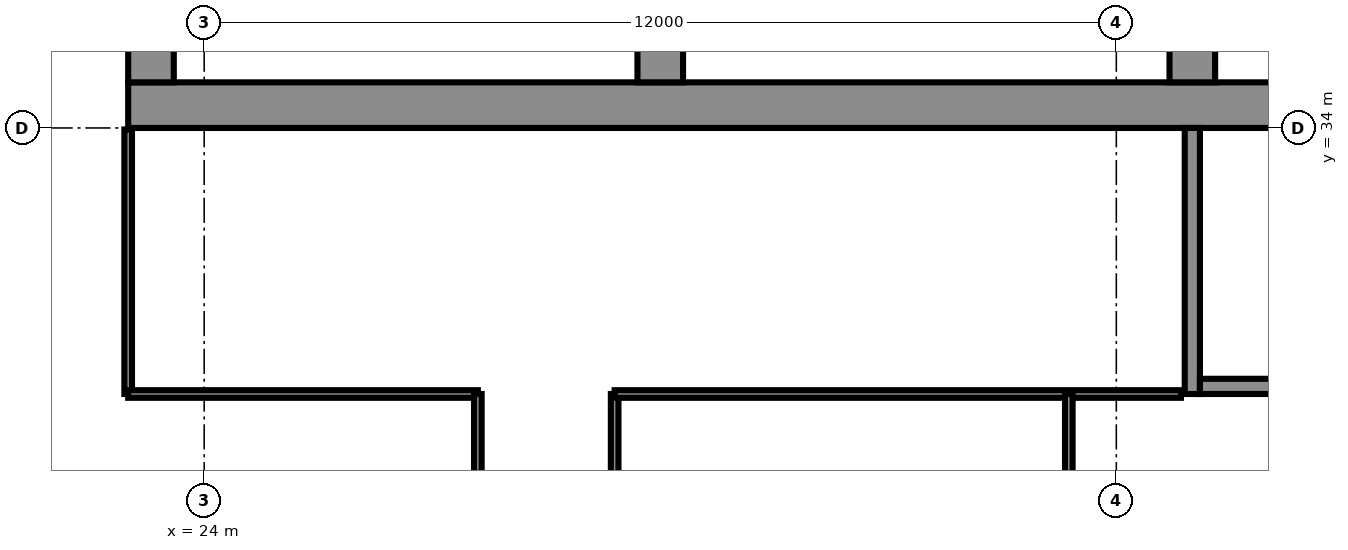
"""IFC4 building model, lengths in metres.
Left out: names, types, materials, properties, quantities, classifications, styles, units other than length and angle.
Written with IfcOpenShell. Run it as: python <this file> out.ifc"""

import sys

from ifc_helpers import new_model, si_unit, direction, frame, frame_2d, origin, place, context, subcontext, project, spatial, polyline, rectangle, outline, extrude, element, fill, save


model = new_model("IFC4")
c1 = context("Model", 3, precision=1e-05, world=origin(), true_north=direction((0.0, 1.0)))
c2 = subcontext(c1, "Body", "Model", "MODEL_VIEW")
j1 = project(units=[si_unit("LENGTHUNIT", "METRE"), si_unit("PLANEANGLEUNIT", "RADIAN")], contexts=[c1])
p1 = place(None, origin())
s1 = spatial("IfcSite", under=j1, at=p1, CompositionType="ELEMENT")
p2 = place(p1, origin())
s2 = spatial("IfcBuilding", under=s1, at=p2, CompositionType="ELEMENT")
p3 = place(p2, frame((0.0, 0.0, 207.1)))
s3 = spatial("IfcBuildingStorey", under=s2, at=p3, CompositionType="ELEMENT", Elevation=207.1)
p4 = place(p3, frame((23.0, 34.3, 0.0), z_axis=(0.0, 0.0, 1.0), x_axis=(1.0, 0.0, 0.0)))
e1 = element("IfcWall", 1, at=p4, inside=s3, PredefinedType="SHEAR", context=c2, shape_type="SweptSolid", body=[
    extrude(rectangle(XDim=35.0, YDim=0.6, at=frame_2d((17.5, 0.0))), origin(), (0.0, 0.0, 1.0), 3.6),
])
p5 = place(p4, frame((0.65, 0.0, 0.0)))
e2 = element("IfcOpeningElement", 2, at=p5, cuts=e1, PredefinedType="OPENING", context=c2, shape_type="SweptSolid", body=[
    extrude(rectangle(XDim=1.2, YDim=2.1, at=frame_2d((0.6, 1.05))), frame((0.0, 0.31, 0.0), z_axis=(0.0, -1.0, 0.0), x_axis=(1.0, 0.0, 0.0)), (0.0, 0.0, 1.0), 0.62),
])
p6 = place(p4, frame((7.717, 0.0, 0.0)))
e3 = element("IfcOpeningElement", 3, at=p6, cuts=e1, PredefinedType="OPENING", context=c2, shape_type="SweptSolid", body=[
    extrude(rectangle(XDim=1.1, YDim=2.1, at=frame_2d((0.55, 1.05))), frame((0.0, 0.31, 0.0), z_axis=(0.0, -1.0, 0.0), x_axis=(1.0, 0.0, 0.0)), (0.0, 0.0, 1.0), 0.62),
])
p7 = place(p4, frame((12.183, 0.0, 0.0)))
e4 = element("IfcOpeningElement", 4, at=p7, cuts=e1, PredefinedType="OPENING", context=c2, shape_type="SweptSolid", body=[
    extrude(rectangle(XDim=1.1, YDim=2.1, at=frame_2d((0.55, 1.05))), frame((0.0, 0.31, 0.0), z_axis=(0.0, -1.0, 0.0), x_axis=(1.0, 0.0, 0.0)), (0.0, 0.0, 1.0), 0.62),
])
p8 = place(p4, frame((9.8, 0.0, 0.0)))
e5 = element("IfcOpeningElement", 5, at=p8, cuts=e1, PredefinedType="OPENING", context=c2, shape_type="SweptSolid", body=[
    extrude(rectangle(XDim=1.4, YDim=2.1, at=frame_2d((0.7, 1.05))), frame((0.0, 0.31, 0.0), z_axis=(0.0, -1.0, 0.0), x_axis=(1.0, 0.0, 0.0)), (0.0, 0.0, 1.0), 0.62),
])
p9 = place(p4, frame((14.717, 0.0, 0.0)))
e6 = element("IfcOpeningElement", 6, at=p9, cuts=e1, PredefinedType="OPENING", context=c2, shape_type="SweptSolid", body=[
    extrude(rectangle(XDim=1.1, YDim=2.1, at=frame_2d((0.55, 1.05))), frame((0.0, 0.31, 0.0), z_axis=(0.0, -1.0, 0.0), x_axis=(1.0, 0.0, 0.0)), (0.0, 0.0, 1.0), 0.62),
])
p10 = place(p4, frame((16.95, 0.0, 0.0)))
e7 = element("IfcOpeningElement", 7, at=p10, cuts=e1, PredefinedType="OPENING", context=c2, shape_type="SweptSolid", body=[
    extrude(rectangle(XDim=1.1, YDim=2.1, at=frame_2d((0.55, 1.05))), frame((0.0, 0.31, 0.0), z_axis=(0.0, -1.0, 0.0), x_axis=(1.0, 0.0, 0.0)), (0.0, 0.0, 1.0), 0.62),
])
p11 = place(p4, frame((19.183, 0.0, 0.0)))
e8 = element("IfcOpeningElement", 8, at=p11, cuts=e1, PredefinedType="OPENING", context=c2, shape_type="SweptSolid", body=[
    extrude(rectangle(XDim=1.1, YDim=2.1, at=frame_2d((0.55, 1.05))), frame((0.0, 0.31, 0.0), z_axis=(0.0, -1.0, 0.0), x_axis=(1.0, 0.0, 0.0)), (0.0, 0.0, 1.0), 0.62),
])
p12 = place(p4, frame((26.15, 0.0, 0.0)))
e9 = element("IfcOpeningElement", 9, at=p12, cuts=e1, PredefinedType="OPENING", context=c2, shape_type="SweptSolid", body=[
    extrude(rectangle(XDim=1.2, YDim=2.1, at=frame_2d((0.6, 1.05))), frame((0.0, 0.31, 0.0), z_axis=(0.0, -1.0, 0.0), x_axis=(1.0, 0.0, 0.0)), (0.0, 0.0, 1.0), 0.62),
])
p13 = place(p4, frame((28.767, 0.0, 0.0)))
e10 = element("IfcOpeningElement", 10, at=p13, cuts=e1, PredefinedType="OPENING", context=c2, shape_type="SweptSolid", body=[
    extrude(rectangle(XDim=1.0, YDim=2.1, at=frame_2d((0.5, 1.05))), frame((0.0, 0.31, 0.0), z_axis=(0.0, -1.0, 0.0), x_axis=(1.0, 0.0, 0.0)), (0.0, 0.0, 1.0), 0.62),
])
p14 = place(p4, frame((33.083, 0.0, 0.0)))
e11 = element("IfcOpeningElement", 11, at=p14, cuts=e1, PredefinedType="OPENING", context=c2, shape_type="SweptSolid", body=[
    extrude(rectangle(XDim=1.0, YDim=2.1, at=frame_2d((0.5, 1.05))), frame((0.0, 0.31, 0.0), z_axis=(0.0, -1.0, 0.0), x_axis=(1.0, 0.0, 0.0)), (0.0, 0.0, 1.0), 0.62),
])
p15 = place(p4, frame((30.8, 0.0, 0.0)))
e12 = element("IfcOpeningElement", 12, at=p15, cuts=e1, PredefinedType="OPENING", context=c2, shape_type="SweptSolid", body=[
    extrude(rectangle(XDim=1.4, YDim=2.1, at=frame_2d((0.7, 1.05))), frame((0.0, 0.31, 0.0), z_axis=(0.0, -1.0, 0.0), x_axis=(1.0, 0.0, 0.0)), (0.0, 0.0, 1.0), 0.62),
])
p16 = place(p3, frame((23.3, 34.6, 0.0), z_axis=(0.0, 0.0, 1.0), x_axis=(0.0, 1.0, 0.0)))
e13 = element("IfcWall", 13, at=p16, inside=s3, PredefinedType="SHEAR", context=c2, shape_type="SweptSolid", body=[
    extrude(rectangle(XDim=13.585, YDim=0.6, at=frame_2d((6.792, 0.0))), origin(), (0.0, 0.0, 1.0), 3.6),
])
p17 = place(p3, frame((30.0, 34.6, 0.0), z_axis=(0.0, 0.0, 1.0), x_axis=(0.0, 1.0, 0.0)))
e14 = element("IfcWall", 14, at=p17, inside=s3, PredefinedType="SHEAR", context=c2, shape_type="SweptSolid", body=[
    extrude(rectangle(XDim=14.171, YDim=0.6, at=frame_2d((7.085, 0.0))), origin(), (0.0, 0.0, 1.0), 3.6),
])
p18 = place(p17, frame((3.8, 0.0, 0.0)))
e15 = element("IfcOpeningElement", 15, at=p18, cuts=e14, PredefinedType="OPENING", context=c2, shape_type="SweptSolid", body=[
    extrude(rectangle(XDim=1.1, YDim=2.1, at=frame_2d((0.55, 1.05))), frame((0.0, 0.31, 0.0), z_axis=(0.0, -1.0, 0.0), x_axis=(1.0, 0.0, 0.0)), (0.0, 0.0, 1.0), 0.62),
])
p19 = place(p3, frame((37.0, 34.6, 0.0), z_axis=(0.0, 0.0, 1.0), x_axis=(0.0, 1.0, 0.0)))
e16 = element("IfcWall", 16, at=p19, inside=s3, PredefinedType="SHEAR", context=c2, shape_type="SweptSolid", body=[
    extrude(rectangle(XDim=14.784, YDim=0.6, at=frame_2d((7.392, 0.0))), origin(), (0.0, 0.0, 1.0), 3.6),
])
p20 = place(p19, frame((11.302, 0.0, 0.0)))
e17 = element("IfcOpeningElement", 17, at=p20, cuts=e16, PredefinedType="OPENING", context=c2, shape_type="SweptSolid", body=[
    extrude(rectangle(XDim=1.0, YDim=2.1, at=frame_2d((0.5, 1.05))), frame((0.0, 0.31, 0.0), z_axis=(0.0, -1.0, 0.0), x_axis=(1.0, 0.0, 0.0)), (0.0, 0.0, 1.0), 0.62),
])
p21 = place(p19, frame((3.8, 0.0, 0.0)))
e18 = element("IfcOpeningElement", 18, at=p21, cuts=e16, PredefinedType="OPENING", context=c2, shape_type="SweptSolid", body=[
    extrude(rectangle(XDim=1.1, YDim=2.1, at=frame_2d((0.55, 1.05))), frame((0.0, 0.31, 0.0), z_axis=(0.0, -1.0, 0.0), x_axis=(1.0, 0.0, 0.0)), (0.0, 0.0, 1.0), 0.62),
])
p22 = place(p3, frame((0.0, 0.0, -0.0)))
e19 = element("IfcWall", 19, at=p22, inside=s3, PredefinedType="PARTITIONING", context=c2, shape_type="SweptSolid", body=[
    extrude(outline(polyline([(32.233, 37.45), (30.3, 37.45), (30.3, 37.65), (32.233, 37.65), (32.433, 37.65), (32.433, 34.6), (32.233, 34.6), (32.233, 37.45)])), origin(), (0.0, 0.0, 1.0), 3.2),
])
p23 = place(p3, frame((0.0, 0.0, -0.0)))
e20 = element("IfcWall", 20, at=p23, inside=s3, PredefinedType="PARTITIONING", context=c2, shape_type="SweptSolid", body=[
    extrude(outline(polyline([(34.567, 37.65), (34.767, 37.65), (36.7, 37.65), (36.7, 37.45), (34.767, 37.45), (34.767, 34.6), (34.567, 34.6), (34.567, 37.65)])), origin(), (0.0, 0.0, 1.0), 3.2),
])
p24 = place(p3, frame((0.0, 0.0, -0.0)))
e21 = element("IfcWall", 21, at=p24, inside=s3, PredefinedType="PARTITIONING", context=c2, shape_type="SweptSolid", body=[
    extrude(outline(polyline([(41.567, 37.1), (39.433, 37.1), (39.433, 34.6), (39.233, 34.6), (39.233, 37.45), (37.3, 37.45), (37.3, 37.65), (39.233, 37.65), (39.433, 37.65), (39.433, 37.3), (41.567, 37.3), (41.567, 37.35), (41.767, 37.35), (43.7, 37.35), (43.7, 37.15), (41.767, 37.15), (41.767, 34.6), (41.567, 34.6), (41.567, 37.1)])), origin(), (0.0, 0.0, 1.0), 3.2),
])
p25 = place(p3, frame((37.0, 30.5, 0.0), z_axis=(0.0, 0.0, 1.0), x_axis=(0.0, 1.0, 0.0)))
e22 = element("IfcWall", 22, at=p25, inside=s3, PredefinedType="PARTITIONING", context=c2, shape_type="SweptSolid", body=[
    extrude(rectangle(XDim=3.5, YDim=0.2, at=frame_2d((1.75, 0.0))), origin(), (0.0, 0.0, 1.0), 3.2),
])
p26 = place(p25, frame((1.2, 0.0, 0.0)))
e23 = element("IfcOpeningElement", 23, at=p26, cuts=e22, PredefinedType="OPENING", context=c2, shape_type="SweptSolid", body=[
    extrude(rectangle(XDim=1.1, YDim=2.1, at=frame_2d((0.55, 1.05))), frame((0.0, 0.11, 0.0), z_axis=(0.0, -1.0, 0.0), x_axis=(1.0, 0.0, 0.0)), (0.0, 0.0, 1.0), 0.22),
])
p27 = place(p3, frame((37.1, 30.6, 0.0), z_axis=(0.0, 0.0, 1.0), x_axis=(1.0, 0.0, 0.0)))
e24 = element("IfcWall", 24, at=p27, inside=s3, PredefinedType="PARTITIONING", context=c2, shape_type="SweptSolid", body=[
    extrude(rectangle(XDim=2.8, YDim=0.2, at=frame_2d((1.4, 0.0))), origin(), (0.0, 0.0, 1.0), 3.2),
])
p28 = place(p3, frame((23.0, 30.5, 0.0), z_axis=(0.0, 0.0, 1.0), x_axis=(0.0, 1.0, 0.0)))
e25 = element("IfcWall", 25, at=p28, inside=s3, PredefinedType="PARTITIONING", context=c2, shape_type="SweptSolid", body=[
    extrude(rectangle(XDim=3.48, YDim=0.1, at=frame_2d((1.74, 0.0))), origin(), (0.0, 0.0, 1.0), 3.2),
])
p29 = place(p28, frame((1.28, 0.0, 0.0)))
e26 = element("IfcOpeningElement", 26, at=p29, cuts=e25, PredefinedType="OPENING", context=c2, shape_type="SweptSolid", body=[
    extrude(rectangle(XDim=1.0, YDim=2.1, at=frame_2d((0.5, 1.05))), frame((0.0, 0.06, 0.0), z_axis=(0.0, -1.0, 0.0), x_axis=(1.0, 0.0, 0.0)), (0.0, 0.0, 1.0), 0.12),
])
p30 = place(p3, frame((23.0, 30.5, 0.0), z_axis=(0.0, 0.0, 1.0), x_axis=(1.0, 0.0, 0.0)))
e27 = element("IfcWall", 27, at=p30, inside=s3, PredefinedType="PARTITIONING", context=c2, shape_type="SweptSolid", body=[
    extrude(rectangle(XDim=4.6, YDim=0.1, at=frame_2d((2.3, 0.0))), origin(), (0.0, 0.0, 1.0), 3.2),
])
p31 = place(p3, frame((27.6, 23.9, 0.0), z_axis=(0.0, 0.0, 1.0), x_axis=(0.0, 1.0, 0.0)))
e28 = element("IfcWall", 28, at=p31, inside=s3, PredefinedType="PARTITIONING", context=c2, shape_type="SweptSolid", body=[
    extrude(rectangle(XDim=6.6, YDim=0.1, at=frame_2d((3.3, 0.0))), origin(), (0.0, 0.0, 1.0), 3.2),
])
p32 = place(p3, frame((29.4, 22.1, 0.0), z_axis=(0.0, 0.0, 1.0), x_axis=(0.0, 1.0, 0.0)))
e29 = element("IfcWall", 29, at=p32, inside=s3, PredefinedType="PARTITIONING", context=c2, shape_type="SweptSolid", body=[
    extrude(rectangle(XDim=8.4, YDim=0.1, at=frame_2d((4.2, 0.0))), origin(), (0.0, 0.0, 1.0), 3.2),
])
p33 = place(p3, frame((29.4, 30.5, 0.0), z_axis=(0.0, 0.0, 1.0), x_axis=(1.0, 0.0, 0.0)))
e30 = element("IfcWall", 30, at=p33, inside=s3, PredefinedType="PARTITIONING", context=c2, shape_type="SweptSolid", body=[
    extrude(rectangle(XDim=7.45, YDim=0.1, at=frame_2d((3.725, 0.0))), origin(), (0.0, 0.0, 1.0), 3.2),
])
p34 = place(p3, frame((35.375, 19.205, 0.0), z_axis=(0.0, 0.0, 1.0), x_axis=(0.0, 1.0, 0.0)))
e31 = element("IfcWall", 31, at=p34, inside=s3, PredefinedType="PARTITIONING", context=c2, shape_type="SweptSolid", body=[
    extrude(rectangle(XDim=11.295, YDim=0.1, at=frame_2d((5.647, 0.0))), origin(), (0.0, 0.0, 1.0), 3.2),
])
p35 = place(p5, origin())
e32 = element("IfcDoor", 32, at=p35, inside=s3, OperationType="SINGLE_SWING_LEFT", PredefinedType="DOOR", context=c2, shape_type="SweptSolid", body=[
    extrude(rectangle(XDim=1.2, YDim=2.1, at=frame_2d((0.6, 1.05))), frame((0.0, 0.025, 0.0), z_axis=(0.0, -1.0, 0.0), x_axis=(1.0, 0.0, 0.0)), (0.0, 0.0, 1.0), 0.05),
])
fill(e2, e32)
p36 = place(p6, origin())
e33 = element("IfcDoor", 33, at=p36, inside=s3, OperationType="DOUBLE_DOOR_SLIDING", PredefinedType="DOOR", context=c2, shape_type="SweptSolid", body=[
    extrude(rectangle(XDim=1.1, YDim=2.1, at=frame_2d((0.55, 1.05))), frame((0.0, 0.025, 0.0), z_axis=(0.0, -1.0, 0.0), x_axis=(1.0, 0.0, 0.0)), (0.0, 0.0, 1.0), 0.05),
])
fill(e3, e33)
p37 = place(p7, origin())
e34 = element("IfcDoor", 34, at=p37, inside=s3, OperationType="DOUBLE_DOOR_SLIDING", PredefinedType="DOOR", context=c2, shape_type="SweptSolid", body=[
    extrude(rectangle(XDim=1.1, YDim=2.1, at=frame_2d((0.55, 1.05))), frame((0.0, 0.025, 0.0), z_axis=(0.0, -1.0, 0.0), x_axis=(1.0, 0.0, 0.0)), (0.0, 0.0, 1.0), 0.05),
])
fill(e4, e34)
p38 = place(p8, origin())
e35 = element("IfcDoor", 35, at=p38, inside=s3, OperationType="DOUBLE_DOOR_SINGLE_SWING", PredefinedType="DOOR", context=c2, shape_type="SweptSolid", body=[
    extrude(rectangle(XDim=1.4, YDim=2.1, at=frame_2d((0.7, 1.05))), frame((0.0, 0.025, 0.0), z_axis=(0.0, -1.0, 0.0), x_axis=(1.0, 0.0, 0.0)), (0.0, 0.0, 1.0), 0.05),
])
fill(e5, e35)
p39 = place(p9, origin())
e36 = element("IfcDoor", 36, at=p39, inside=s3, OperationType="DOUBLE_DOOR_SLIDING", PredefinedType="DOOR", context=c2, shape_type="SweptSolid", body=[
    extrude(rectangle(XDim=1.1, YDim=2.1, at=frame_2d((0.55, 1.05))), frame((0.0, 0.025, 0.0), z_axis=(0.0, -1.0, 0.0), x_axis=(1.0, 0.0, 0.0)), (0.0, 0.0, 1.0), 0.05),
])
fill(e6, e36)
p40 = place(p26, origin())
e37 = element("IfcDoor", 37, at=p40, inside=s3, OperationType="SINGLE_SWING_LEFT", PredefinedType="DOOR", context=c2, shape_type="SweptSolid", body=[
    extrude(rectangle(XDim=1.1, YDim=2.1, at=frame_2d((0.55, 1.05))), frame((0.0, 0.025, 0.0), z_axis=(0.0, -1.0, 0.0), x_axis=(1.0, 0.0, 0.0)), (0.0, 0.0, 1.0), 0.05),
])
fill(e23, e37)
p41 = place(p29, origin())
e38 = element("IfcDoor", 38, at=p41, inside=s3, OperationType="SINGLE_SWING_RIGHT", PredefinedType="DOOR", context=c2, shape_type="SweptSolid", body=[
    extrude(rectangle(XDim=1.0, YDim=2.1, at=frame_2d((0.5, 1.05))), frame((0.0, 0.025, 0.0), z_axis=(0.0, -1.0, 0.0), x_axis=(1.0, 0.0, 0.0)), (0.0, 0.0, 1.0), 0.05),
])
fill(e26, e38)
save(model, sys.argv[1])
